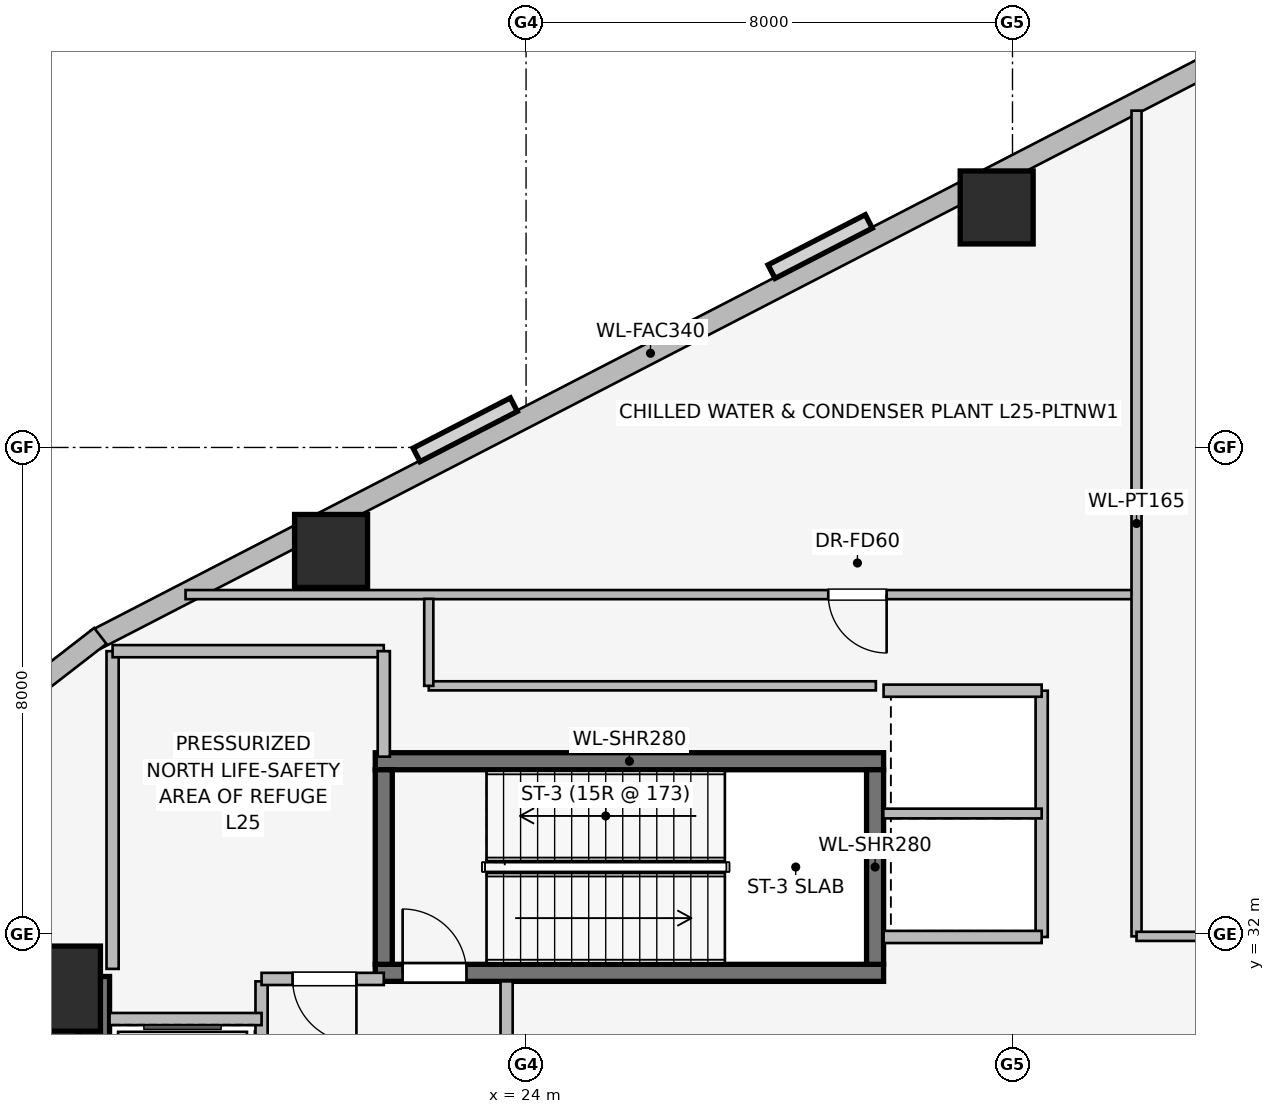
"""IFC4 building model, lengths in metres.
Left out: names, types, materials, properties, quantities, classifications, styles, units other than length and angle.
Written with IfcOpenShell. Run it as: python <this file> out.ifc"""

import sys

from ifc_helpers import new_model, si_unit, direction, frame, frame_2d, origin, origin_2d, place, context, subcontext, project, spatial, rectangle, extrude, element, fill, save


model = new_model("IFC4")
c1 = context("Model", 3, precision=1e-05, world=origin(), true_north=direction((0.0, 1.0)))
c2 = subcontext(c1, "Body", "Model", "MODEL_VIEW")
j1 = project(units=[si_unit("LENGTHUNIT", "METRE"), si_unit("PLANEANGLEUNIT", "RADIAN")], contexts=[c1])
p1 = place(None, origin())
s1 = spatial("IfcSite", under=j1, at=p1, CompositionType="ELEMENT")
p2 = place(p1, origin())
s2 = spatial("IfcBuilding", under=s1, at=p2, CompositionType="ELEMENT")
p3 = place(p2, frame((0.0, 0.0, 96.35)))
s3 = spatial("IfcBuildingStorey", under=s2, at=p3, CompositionType="ELEMENT", Elevation=96.35)
p4 = place(p3, frame((16.9, 25.68, 0.0), z_axis=(0.0, 0.0, 1.0), x_axis=(0.0, 1.0, 0.0)))
e1 = element("IfcWall", 1, at=p4, inside=s3, PredefinedType="SHEAR", context=c2, shape_type="SweptSolid", body=[
    extrude(rectangle(XDim=5.62, YDim=0.5, at=frame_2d((2.81, 0.0))), origin(), (0.0, 0.0, 1.0), 5.2),
])
p5 = place(p3, frame((21.52, 31.36, 0.0), z_axis=(0.0, 0.0, 1.0), x_axis=(1.0, 0.0, 0.0)))
e2 = element("IfcWall", 2, at=p5, inside=s3, PredefinedType="SHEAR", context=c2, shape_type="SweptSolid", body=[
    extrude(rectangle(XDim=8.36, YDim=0.28, at=frame_2d((4.18, 0.0))), origin(), (0.0, 0.0, 1.0), 5.2),
])
p6 = place(p5, frame((0.45, 0.0, 0.0)))
e3 = element("IfcOpeningElement", 3, at=p6, cuts=e2, PredefinedType="OPENING", context=c2, shape_type="SweptSolid", body=[
    extrude(rectangle(XDim=1.05, YDim=2.0, at=frame_2d((0.525, 1.0))), frame((0.0, 0.15, 0.0), z_axis=(0.0, -1.0, 0.0), x_axis=(1.0, 0.0, 0.0)), (0.0, 0.0, 1.0), 0.3),
])
p7 = place(p3, frame((29.88, 34.84, 0.0), z_axis=(0.0, 0.0, 1.0), x_axis=(-1.0, 0.0, 0.0)))
e4 = element("IfcWall", 4, at=p7, inside=s3, PredefinedType="SHEAR", context=c2, shape_type="SweptSolid", body=[
    extrude(rectangle(XDim=8.36, YDim=0.28, at=frame_2d((4.18, 0.0))), origin(), (0.0, 0.0, 1.0), 5.2),
])
for number, where, z_axis, x_axis in (
    (5, (21.66, 34.7, 0.0), (0.0, 0.0, 1.0), (0.0, -1.0, 0.0)),
    (6, (29.74, 31.5, 0.0), (0.0, 0.0, 1.0), (0.0, 1.0, 0.0)),
):
    element("IfcWall", number, at=place(p3, frame(where, z_axis=z_axis, x_axis=x_axis)), inside=s3, PredefinedType="SHEAR", context=c2, shape_type="SweptSolid", body=[
        extrude(rectangle(XDim=3.2, YDim=0.28, at=frame_2d((1.6, 0.0))), origin(), (0.0, 0.0, 1.0), 5.2),
    ])
p8 = place(p3, frame((16.3, 31.1, 0.0), z_axis=(0.0, 0.0, 1.0), x_axis=(1.0, 0.0, 0.0)))
e7 = element("IfcColumn", 7, at=p8, inside=s3, PredefinedType="COLUMN", context=c2, shape_type="SweptSolid", body=[
    extrude(rectangle(XDim=1.4, YDim=1.4, at=origin_2d()), origin(), (0.0, 0.0, 1.0), 5.2),
])
for number, where, z_axis, x_axis in (
    (8, (31.74, 43.947, 0.0), (0.0, 0.0, 1.0), (1.0, 0.0, 0.0)),
    (9, (20.793, 38.298, 0.0), (0.0, 0.0, 1.0), (1.0, 0.0, 0.0)),
):
    element("IfcColumn", number, at=place(p3, frame(where, z_axis=z_axis, x_axis=x_axis)), inside=s3, PredefinedType="COLUMN", context=c2, shape_type="SweptSolid", body=[
        extrude(rectangle(XDim=1.2, YDim=1.2, at=origin_2d()), origin(), (0.0, 0.0, 1.0), 5.2),
    ])
p9 = place(p3, frame((16.924, 36.841, 0.0), z_axis=(0.0, 0.0, 1.0), x_axis=(0.888634413993, 0.458616264721, 0.0)))
e10 = element("IfcWall", 10, at=p9, inside=s3, PredefinedType="STANDARD", context=c2, shape_type="SweptSolid", body=[
    extrude(rectangle(XDim=20.531, YDim=0.34, at=frame_2d((10.266, 0.0))), origin(), (0.0, 0.0, 1.0), 3.688),
])
p10 = place(p3, frame((15.673, 35.875, 0.0), z_axis=(0.0, 0.0, 1.0), x_axis=(0.790691856293, 0.61221433207, 0.0)))
e11 = element("IfcWall", 11, at=p10, inside=s3, PredefinedType="STANDARD", context=c2, shape_type="SweptSolid", body=[
    extrude(rectangle(XDim=1.676, YDim=0.33, at=frame_2d((0.838, 0.0))), origin(), (0.0, 0.0, 1.0), 4.78),
])
p11 = place(p3, frame((19.65, 25.68, 0.0), z_axis=(0.0, 0.0, 1.0), x_axis=(0.0, 1.0, 0.0)))
e12 = element("IfcWall", 12, at=p11, inside=s3, PredefinedType="PARTITIONING", context=c2, shape_type="SweptSolid", body=[
    extrude(rectangle(XDim=5.54, YDim=0.2, at=frame_2d((2.77, 0.0))), origin(), (0.0, 0.0, 1.0), 4.78),
])
p12 = place(p11, frame((0.62, 0.0, 0.0)))
e13 = element("IfcOpeningElement", 13, at=p12, cuts=e12, PredefinedType="OPENING", context=c2, shape_type="SweptSolid", body=[
    extrude(rectangle(XDim=1.1, YDim=2.2, at=frame_2d((0.55, 1.1))), frame((0.0, 0.11, 0.0), z_axis=(0.0, -1.0, 0.0), x_axis=(1.0, 0.0, 0.0)), (0.0, 0.0, 1.0), 0.22),
])
p13 = place(p11, frame((3.12, 0.0, 0.0)))
e14 = element("IfcOpeningElement", 14, at=p13, cuts=e12, PredefinedType="OPENING", context=c2, shape_type="SweptSolid", body=[
    extrude(rectangle(XDim=1.1, YDim=2.2, at=frame_2d((0.55, 1.1))), frame((0.0, 0.11, 0.0), z_axis=(0.0, -1.0, 0.0), x_axis=(1.0, 0.0, 0.0)), (0.0, 0.0, 1.0), 0.22),
])
p14 = place(p3, frame((23.68, 25.68, 0.0), z_axis=(0.0, 0.0, 1.0), x_axis=(0.0, 1.0, 0.0)))
e15 = element("IfcWall", 15, at=p14, inside=s3, PredefinedType="PARTITIONING", context=c2, shape_type="SweptSolid", body=[
    extrude(rectangle(XDim=5.54, YDim=0.2, at=frame_2d((2.77, 0.0))), origin(), (0.0, 0.0, 1.0), 4.78),
])
p15 = place(p14, frame((1.8, 0.0, 0.0)))
e16 = element("IfcOpeningElement", 16, at=p15, cuts=e15, PredefinedType="OPENING", context=c2, shape_type="SweptSolid", body=[
    extrude(rectangle(XDim=1.05, YDim=2.0, at=frame_2d((0.525, 1.0))), frame((0.0, 0.11, 0.0), z_axis=(0.0, -1.0, 0.0), x_axis=(1.0, 0.0, 0.0)), (0.0, 0.0, 1.0), 0.22),
])
p16 = place(p3, frame((21.66, 31.26, 0.0), z_axis=(0.0, 0.0, 1.0), x_axis=(-1.0, 0.0, 0.0)))
e17 = element("IfcWall", 17, at=p16, inside=s3, PredefinedType="PARTITIONING", context=c2, shape_type="SweptSolid", body=[
    extrude(rectangle(XDim=2.01, YDim=0.2, at=frame_2d((1.005, 0.0))), origin(), (0.0, 0.0, 1.0), 4.78),
])
p17 = place(p16, frame((0.45, 0.0, 0.0)))
e18 = element("IfcOpeningElement", 18, at=p17, cuts=e17, PredefinedType="OPENING", context=c2, shape_type="SweptSolid", body=[
    extrude(rectangle(XDim=1.05, YDim=2.0, at=frame_2d((0.525, 1.0))), frame((0.0, 0.11, 0.0), z_axis=(0.0, -1.0, 0.0), x_axis=(1.0, 0.0, 0.0)), (0.0, 0.0, 1.0), 0.22),
])
p18 = place(p3, frame((19.65, 30.6, 0.0), z_axis=(0.0, 0.0, 1.0), x_axis=(-1.0, 0.0, 0.0)))
e19 = element("IfcWall", 19, at=p18, inside=s3, PredefinedType="PARTITIONING", context=c2, shape_type="SweptSolid", body=[
    extrude(rectangle(XDim=2.5, YDim=0.2, at=frame_2d((1.25, 0.0))), origin(), (0.0, 0.0, 1.0), 3.68),
])
p19 = place(p3, frame((32.48, 31.95, 0.0), z_axis=(0.0, 0.0, 1.0), x_axis=(0.0, 1.0, 0.0)))
e20 = element("IfcWall", 20, at=p19, inside=s3, PredefinedType="PARTITIONING", context=c2, shape_type="SweptSolid", body=[
    extrude(rectangle(XDim=4.05, YDim=0.2, at=frame_2d((2.025, 0.0))), origin(), (0.0, 0.0, 1.0), 3.688),
])
for number, where, z_axis, x_axis in (
    (21, (29.88, 36.0, 0.0), (0.0, 0.0, 1.0), (1.0, 0.0, 0.0)),
    (22, (32.48, 31.95, 0.0), (0.0, 0.0, 1.0), (-1.0, 0.0, 0.0)),
):
    element("IfcWall", number, at=place(p3, frame(where, z_axis=z_axis, x_axis=x_axis)), inside=s3, PredefinedType="PARTITIONING", context=c2, shape_type="SweptSolid", body=[
        extrude(rectangle(XDim=2.6, YDim=0.2, at=frame_2d((1.3, 0.0))), origin(), (0.0, 0.0, 1.0), 4.78),
    ])
p20 = place(p3, frame((29.875, 33.98, 0.0), z_axis=(0.0, 0.0, 1.0), x_axis=(1.0, 0.0, 0.0)))
e23 = element("IfcWall", 23, at=p20, inside=s3, PredefinedType="PARTITIONING", context=c2, shape_type="SweptSolid", body=[
    extrude(rectangle(XDim=2.605, YDim=0.16, at=frame_2d((1.302, 0.0))), origin(), (0.0, 0.0, 1.0), 4.78),
])
p21 = place(p3, frame((17.2, 36.65, 0.0), z_axis=(0.0, 0.0, 1.0), x_axis=(0.0, -1.0, 0.0)))
e24 = element("IfcWall", 24, at=p21, inside=s3, PredefinedType="PARTITIONING", context=c2, shape_type="SweptSolid", body=[
    extrude(rectangle(XDim=5.225, YDim=0.2, at=frame_2d((2.612, 0.0))), origin(), (0.0, 0.0, 1.0), 4.78),
])
p22 = place(p3, frame((21.66, 36.65, 0.0), z_axis=(0.0, 0.0, 1.0), x_axis=(-1.0, 0.0, 0.0)))
e25 = element("IfcWall", 25, at=p22, inside=s3, PredefinedType="PARTITIONING", context=c2, shape_type="SweptSolid", body=[
    extrude(rectangle(XDim=4.46, YDim=0.2, at=frame_2d((2.23, 0.0))), origin(), (0.0, 0.0, 1.0), 3.42),
])
p23 = place(p3, frame((21.66, 34.915, 0.0), z_axis=(0.0, 0.0, 1.0), x_axis=(0.0, 1.0, 0.0)))
e26 = element("IfcWall", 26, at=p23, inside=s3, PredefinedType="PARTITIONING", context=c2, shape_type="SweptSolid", body=[
    extrude(rectangle(XDim=1.735, YDim=0.2, at=frame_2d((0.867, 0.0))), origin(), (0.0, 0.0, 1.0), 4.78),
])
p24 = place(p3, frame((34.0, 37.58, 0.0), z_axis=(0.0, 0.0, 1.0), x_axis=(-1.0, 0.0, 0.0)))
e27 = element("IfcWall", 27, at=p24, inside=s3, PredefinedType="PARTITIONING", context=c2, shape_type="SweptSolid", body=[
    extrude(rectangle(XDim=15.6, YDim=0.15, at=frame_2d((7.8, 0.0))), origin(), (0.0, 0.0, 1.0), 3.42),
])
p25 = place(p24, frame((4.07, 0.0, 0.0)))
e28 = element("IfcOpeningElement", 28, at=p25, cuts=e27, PredefinedType="OPENING", context=c2, shape_type="SweptSolid", body=[
    extrude(rectangle(XDim=0.96, YDim=2.0, at=frame_2d((0.48, 1.0))), frame((0.0, 0.085, 0.0), z_axis=(0.0, -1.0, 0.0), x_axis=(1.0, 0.0, 0.0)), (0.0, 0.0, 1.0), 0.17),
])
p26 = place(p3, frame((34.04, 31.96, 0.0), z_axis=(0.0, 0.0, 1.0), x_axis=(0.0, 1.0, 0.0)))
e29 = element("IfcWall", 29, at=p26, inside=s3, PredefinedType="PARTITIONING", context=c2, shape_type="SweptSolid", body=[
    extrude(rectangle(XDim=13.579, YDim=0.165, at=frame_2d((6.79, 0.0))), origin(), (0.0, 0.0, 1.0), 4.78),
])
p27 = place(p3, frame((41.48, 31.96, 0.0), z_axis=(0.0, 0.0, 1.0), x_axis=(-1.0, 0.0, 0.0)))
e30 = element("IfcWall", 30, at=p27, inside=s3, PredefinedType="PARTITIONING", context=c2, shape_type="SweptSolid", body=[
    extrude(rectangle(XDim=7.44, YDim=0.15, at=frame_2d((3.72, 0.0))), origin(), (0.0, 0.0, 1.0), 4.78),
])
p28 = place(p27, frame((3.24, 0.0, 0.0)))
e31 = element("IfcOpeningElement", 31, at=p28, cuts=e30, PredefinedType="OPENING", context=c2, shape_type="SweptSolid", body=[
    extrude(rectangle(XDim=0.96, YDim=2.0, at=frame_2d((0.48, 1.0))), frame((0.0, 0.085, 0.0), z_axis=(0.0, -1.0, 0.0), x_axis=(1.0, 0.0, 0.0)), (0.0, 0.0, 1.0), 0.17),
])
p29 = place(p3, frame((29.753, 36.08, 0.0), z_axis=(0.0, 0.0, 1.0), x_axis=(-1.0, 0.0, 0.0)))
e32 = element("IfcWall", 32, at=p29, inside=s3, PredefinedType="PARTITIONING", context=c2, shape_type="SweptSolid", body=[
    extrude(rectangle(XDim=7.353, YDim=0.15, at=frame_2d((3.677, 0.0))), origin(), (0.0, 0.0, 1.0), 4.78),
])
p30 = place(p3, frame((22.4, 36.08, 0.0), z_axis=(0.0, 0.0, 1.0), x_axis=(0.0, 1.0, 0.0)))
e33 = element("IfcWall", 33, at=p30, inside=s3, PredefinedType="PARTITIONING", context=c2, shape_type="SweptSolid", body=[
    extrude(rectangle(XDim=1.43, YDim=0.15, at=frame_2d((0.715, 0.0))), origin(), (0.0, 0.0, 1.0), 4.78),
])
p31 = place(p6, origin())
e34 = element("IfcDoor", 34, at=p31, inside=s3, OperationType="SINGLE_SWING_LEFT", PredefinedType="DOOR", context=c2, shape_type="SweptSolid", body=[
    extrude(rectangle(XDim=1.05, YDim=2.0, at=frame_2d((0.525, 1.0))), frame((0.0, 0.025, 0.0), z_axis=(0.0, -1.0, 0.0), x_axis=(1.0, 0.0, 0.0)), (0.0, 0.0, 1.0), 0.05),
])
fill(e3, e34)
p32 = place(p17, origin())
e35 = element("IfcDoor", 35, at=p32, inside=s3, OperationType="SINGLE_SWING_LEFT", PredefinedType="DOOR", context=c2, shape_type="SweptSolid", body=[
    extrude(rectangle(XDim=1.05, YDim=2.0, at=frame_2d((0.525, 1.0))), frame((0.0, 0.025, 0.0), z_axis=(0.0, -1.0, 0.0), x_axis=(1.0, 0.0, 0.0)), (0.0, 0.0, 1.0), 0.05),
])
fill(e18, e35)
p33 = place(p25, origin())
e36 = element("IfcDoor", 36, at=p33, inside=s3, OperationType="SINGLE_SWING_LEFT", PredefinedType="DOOR", context=c2, shape_type="SweptSolid", body=[
    extrude(rectangle(XDim=0.96, YDim=2.0, at=frame_2d((0.48, 1.0))), frame((0.0, 0.025, 0.0), z_axis=(0.0, -1.0, 0.0), x_axis=(1.0, 0.0, 0.0)), (0.0, 0.0, 1.0), 0.05),
])
fill(e28, e36)
save(model, sys.argv[1])
